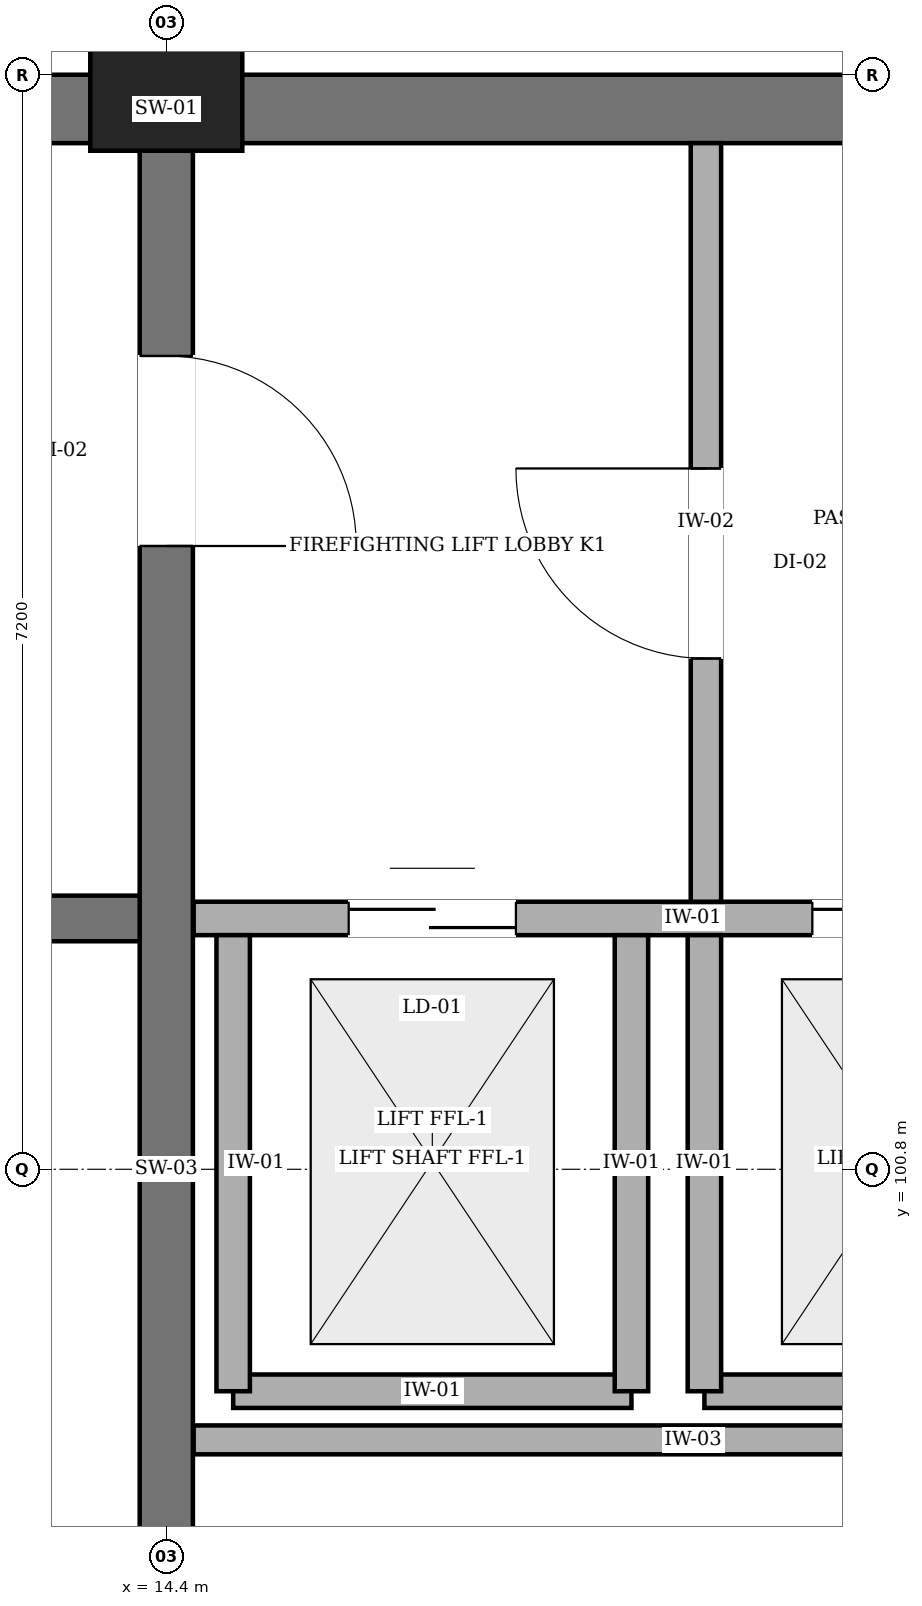
"""IFC4 building model, lengths in metres.
Left out: names, types, materials, properties, quantities, classifications, styles, units other than length and angle.
Written with IfcOpenShell. Run it as: python <this file> out.ifc"""

import sys

from ifc_helpers import new_model, si_unit, direction, frame, frame_2d, origin, origin_2d, place, context, subcontext, project, spatial, rectangle, extrude, element, fill, save


model = new_model("IFC4")
c1 = context("Model", 3, precision=1e-05, world=origin(), true_north=direction((0.0, 1.0)))
c2 = subcontext(c1, "Body", "Model", "MODEL_VIEW")
j1 = project(units=[si_unit("LENGTHUNIT", "METRE"), si_unit("PLANEANGLEUNIT", "RADIAN")], contexts=[c1])
p1 = place(None, origin())
s1 = spatial("IfcSite", under=j1, at=p1, CompositionType="ELEMENT")
p2 = place(p1, origin())
s2 = spatial("IfcBuilding", under=s1, at=p2, CompositionType="ELEMENT")
p3 = place(p2, frame((0.0, 0.0, -10.8)))
s3 = spatial("IfcBuildingStorey", under=s2, at=p3, CompositionType="ELEMENT", Elevation=-10.8)
p4 = place(p3, frame((7.2, 107.775, 0.0), z_axis=(0.0, 0.0, 1.0), x_axis=(1.0, 0.0, 0.0)))
e1 = element("IfcWall", 1, at=p4, inside=s3, PredefinedType="SHEAR", context=c2, shape_type="SweptSolid", body=[
    extrude(rectangle(XDim=14.4, YDim=0.45, at=frame_2d((7.2, 0.0))), origin(), (0.0, 0.0, 1.0), 5.4),
])
p5 = place(p3, frame((14.4, 107.55, 0.0), z_axis=(0.0, 0.0, 1.0), x_axis=(0.0, -1.0, 0.0)))
e2 = element("IfcWall", 2, at=p5, inside=s3, PredefinedType="SHEAR", context=c2, shape_type="SweptSolid", body=[
    extrude(rectangle(XDim=13.5, YDim=0.35, at=frame_2d((6.75, 0.0))), origin(), (0.0, 0.0, 1.0), 5.4),
])
p6 = place(p5, frame((1.4, 0.0, 0.0)))
e3 = element("IfcOpeningElement", 3, at=p6, cuts=e2, PredefinedType="OPENING", context=c2, shape_type="SweptSolid", body=[
    extrude(rectangle(XDim=1.25, YDim=2.2, at=frame_2d((0.625, 1.1))), frame((0.0, 0.185, 0.0), z_axis=(0.0, -1.0, 0.0), x_axis=(1.0, 0.0, 0.0)), (0.0, 0.0, 1.0), 0.37),
])
p7 = place(p3, frame((7.65, 102.45, 0.0), z_axis=(0.0, 0.0, 1.0), x_axis=(1.0, 0.0, 0.0)))
e4 = element("IfcWall", 4, at=p7, inside=s3, PredefinedType="SHEAR", context=c2, shape_type="SweptSolid", body=[
    extrude(rectangle(XDim=6.575, YDim=0.3, at=frame_2d((3.288, 0.0))), origin(), (0.0, 0.0, 1.0), 5.4),
])
p8 = place(p7, frame((2.788, 0.0, 0.0)))
e5 = element("IfcOpeningElement", 5, at=p8, cuts=e4, PredefinedType="OPENING", context=c2, shape_type="SweptSolid", body=[
    extrude(rectangle(XDim=1.4, YDim=2.2, at=frame_2d((0.7, 1.1))), frame((0.0, 0.16, 0.0), z_axis=(0.0, -1.0, 0.0), x_axis=(1.0, 0.0, 0.0)), (0.0, 0.0, 1.0), 0.32),
])
p9 = place(p3, frame((14.4, 108.0, 0.0), z_axis=(0.0, 0.0, 1.0), x_axis=(1.0, 0.0, 0.0)))
e6 = element("IfcColumn", 6, at=p9, inside=s3, PredefinedType="COLUMN", context=c2, shape_type="SweptSolid", body=[
    extrude(rectangle(XDim=1.0, YDim=1.0, at=origin_2d()), origin(), (0.0, 0.0, 1.0), 5.0),
])
p10 = place(p3, frame((14.58, 99.02, 0.0), z_axis=(0.0, 0.0, 1.0), x_axis=(1.0, 0.0, 0.0)))
e7 = element("IfcWall", 7, at=p10, inside=s3, PredefinedType="PARTITIONING", context=c2, shape_type="SweptSolid", body=[
    extrude(rectangle(XDim=6.57, YDim=0.19, at=frame_2d((3.285, 0.0))), origin(), (0.0, 0.0, 1.0), 5.05),
])
p11 = place(p3, frame((14.58, 102.45, 0.0), z_axis=(0.0, 0.0, 1.0), x_axis=(1.0, 0.0, 0.0)))
e8 = element("IfcWall", 8, at=p11, inside=s3, PredefinedType="PARTITIONING", context=c2, shape_type="SweptSolid", body=[
    extrude(rectangle(XDim=6.57, YDim=0.22, at=frame_2d((3.285, 0.0))), origin(), (0.0, 0.0, 1.0), 5.05),
])
p12 = place(p11, frame((1.02, 0.0, 0.0)))
e9 = element("IfcOpeningElement", 9, at=p12, cuts=e8, PredefinedType="OPENING", context=c2, shape_type="SweptSolid", body=[
    extrude(rectangle(XDim=1.1, YDim=2.15, at=frame_2d((0.55, 1.075))), frame((0.0, 0.12, 0.0), z_axis=(0.0, -1.0, 0.0), x_axis=(1.0, 0.0, 0.0)), (0.0, 0.0, 1.0), 0.24),
])
p13 = place(p11, frame((4.07, 0.0, 0.0)))
e10 = element("IfcOpeningElement", 10, at=p13, cuts=e8, PredefinedType="OPENING", context=c2, shape_type="SweptSolid", body=[
    extrude(rectangle(XDim=1.2, YDim=2.15, at=frame_2d((0.6, 1.075))), frame((0.0, 0.12, 0.0), z_axis=(0.0, -1.0, 0.0), x_axis=(1.0, 0.0, 0.0)), (0.0, 0.0, 1.0), 0.24),
])
p14 = place(p3, frame((14.84, 99.34, 0.0), z_axis=(0.0, 0.0, 1.0), x_axis=(1.0, 0.0, 0.0)))
e11 = element("IfcWall", 11, at=p14, inside=s3, PredefinedType="PARTITIONING", context=c2, shape_type="SweptSolid", body=[
    extrude(rectangle(XDim=2.62, YDim=0.22, at=frame_2d((1.31, 0.0))), origin(), (0.0, 0.0, 1.0), 5.05),
])
for number, where, z_axis, x_axis in (
    (12, (14.84, 99.34, 0.0), (0.0, 0.0, 1.0), (0.0, 1.0, 0.0)),
    (13, (17.46, 99.34, 0.0), (0.0, 0.0, 1.0), (0.0, 1.0, 0.0)),
):
    element("IfcWall", number, at=place(p3, frame(where, z_axis=z_axis, x_axis=x_axis)), inside=s3, PredefinedType="PARTITIONING", context=c2, shape_type="SweptSolid", body=[
        extrude(rectangle(XDim=3.0, YDim=0.22, at=frame_2d((1.5, 0.0))), origin(), (0.0, 0.0, 1.0), 5.05),
    ])
p15 = place(p3, frame((17.94, 99.34, 0.0), z_axis=(0.0, 0.0, 1.0), x_axis=(1.0, 0.0, 0.0)))
e14 = element("IfcWall", 14, at=p15, inside=s3, PredefinedType="PARTITIONING", context=c2, shape_type="SweptSolid", body=[
    extrude(rectangle(XDim=2.62, YDim=0.22, at=frame_2d((1.31, 0.0))), origin(), (0.0, 0.0, 1.0), 5.05),
])
p16 = place(p3, frame((17.94, 99.34, 0.0), z_axis=(0.0, 0.0, 1.0), x_axis=(0.0, 1.0, 0.0)))
e15 = element("IfcWall", 15, at=p16, inside=s3, PredefinedType="PARTITIONING", context=c2, shape_type="SweptSolid", body=[
    extrude(rectangle(XDim=3.0, YDim=0.22, at=frame_2d((1.5, 0.0))), origin(), (0.0, 0.0, 1.0), 5.05),
])
p17 = place(p3, frame((17.95, 102.56, 0.0), z_axis=(0.0, 0.0, 1.0), x_axis=(0.0, 1.0, 0.0)))
e16 = element("IfcWall", 16, at=p17, inside=s3, PredefinedType="PARTITIONING", context=c2, shape_type="SweptSolid", body=[
    extrude(rectangle(XDim=4.99, YDim=0.2, at=frame_2d((2.495, 0.0))), origin(), (0.0, 0.0, 1.0), 5.05),
])
p18 = place(p17, frame((1.6, 0.0, 0.0)))
e17 = element("IfcOpeningElement", 17, at=p18, cuts=e16, PredefinedType="OPENING", context=c2, shape_type="SweptSolid", body=[
    extrude(rectangle(XDim=1.25, YDim=2.2, at=frame_2d((0.625, 1.1))), frame((0.0, 0.11, 0.0), z_axis=(0.0, -1.0, 0.0), x_axis=(1.0, 0.0, 0.0)), (0.0, 0.0, 1.0), 0.22),
])
p19 = place(p6, origin())
e18 = element("IfcDoor", 18, at=p19, inside=s3, OperationType="SINGLE_SWING_RIGHT", PredefinedType="DOOR", context=c2, shape_type="SweptSolid", body=[
    extrude(rectangle(XDim=1.25, YDim=2.2, at=frame_2d((0.625, 1.1))), frame((0.0, 0.025, 0.0), z_axis=(0.0, -1.0, 0.0), x_axis=(1.0, 0.0, 0.0)), (0.0, 0.0, 1.0), 0.05),
])
fill(e3, e18)
p20 = place(p12, origin())
e19 = element("IfcDoor", 19, at=p20, inside=s3, OperationType="DOUBLE_DOOR_SLIDING", PredefinedType="DOOR", context=c2, shape_type="SweptSolid", body=[
    extrude(rectangle(XDim=1.1, YDim=2.15, at=frame_2d((0.55, 1.075))), frame((0.0, 0.025, 0.0), z_axis=(0.0, -1.0, 0.0), x_axis=(1.0, 0.0, 0.0)), (0.0, 0.0, 1.0), 0.05),
])
fill(e9, e19)
p21 = place(p13, origin())
e20 = element("IfcDoor", 20, at=p21, inside=s3, OperationType="DOUBLE_DOOR_SLIDING", PredefinedType="DOOR", context=c2, shape_type="SweptSolid", body=[
    extrude(rectangle(XDim=1.2, YDim=2.15, at=frame_2d((0.6, 1.075))), frame((0.0, 0.025, 0.0), z_axis=(0.0, -1.0, 0.0), x_axis=(1.0, 0.0, 0.0)), (0.0, 0.0, 1.0), 0.05),
])
fill(e10, e20)
p22 = place(p18, origin())
e21 = element("IfcDoor", 21, at=p22, inside=s3, OperationType="SINGLE_SWING_RIGHT", PredefinedType="DOOR", context=c2, shape_type="SweptSolid", body=[
    extrude(rectangle(XDim=1.25, YDim=2.2, at=frame_2d((0.625, 1.1))), frame((0.0, 0.025, 0.0), z_axis=(0.0, -1.0, 0.0), x_axis=(1.0, 0.0, 0.0)), (0.0, 0.0, 1.0), 0.05),
])
fill(e17, e21)
save(model, sys.argv[1])
